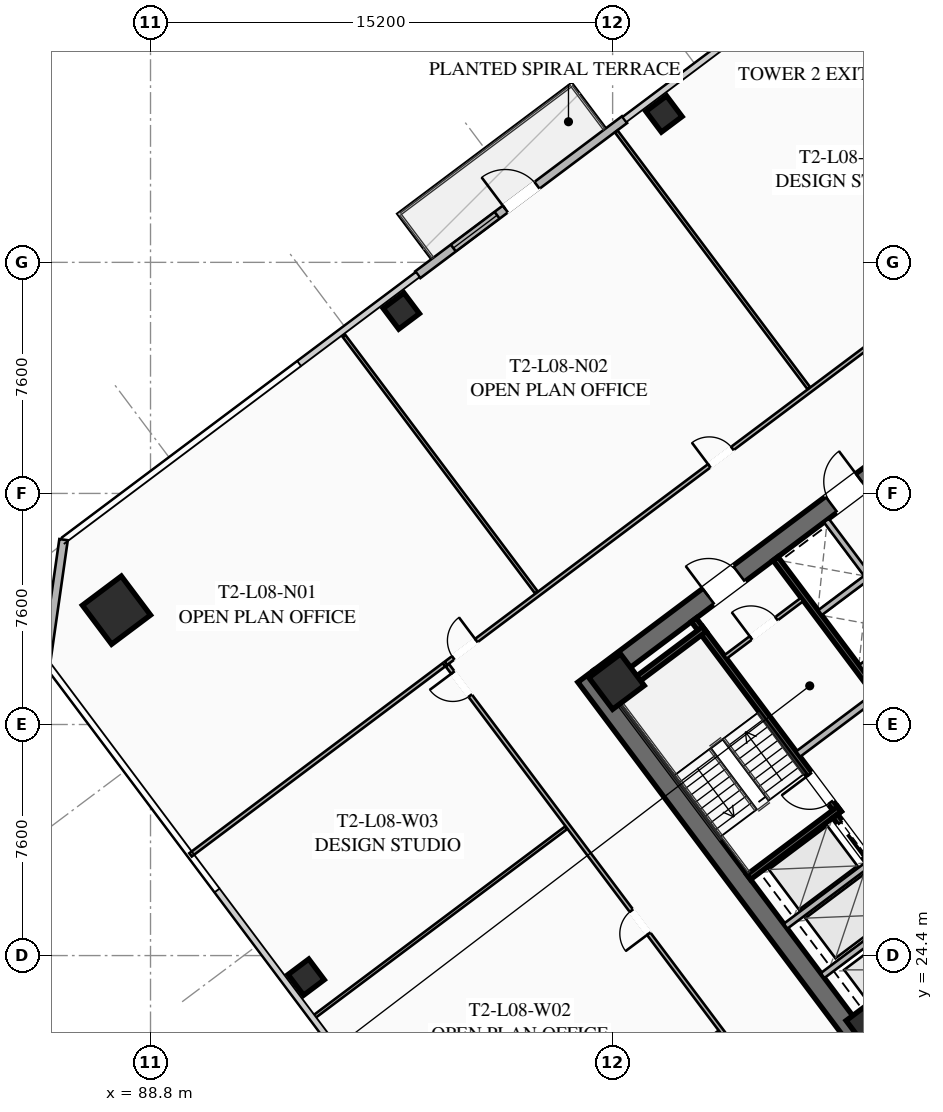
"""IFC4 building model, lengths in metres.
Left out: names, types, materials, properties, quantities, classifications, styles, units other than length and angle.
Written with IfcOpenShell. Run it as: python <this file> out.ifc"""

import sys

from ifc_helpers import new_model, si_unit, direction, frame, frame_2d, origin, origin_2d, place, context, subcontext, project, spatial, rectangle, hollow_rectangle, extrude, element, fill, save


model = new_model("IFC4")
c1 = context("Model", 3, precision=1e-05, world=origin(), true_north=direction((0.0, 1.0)))
c2 = subcontext(c1, "Body", "Model", "MODEL_VIEW")
j1 = project(units=[si_unit("LENGTHUNIT", "METRE"), si_unit("PLANEANGLEUNIT", "RADIAN")], contexts=[c1])
p1 = place(None, origin())
s1 = spatial("IfcSite", under=j1, at=p1, CompositionType="ELEMENT")
p2 = place(p1, origin())
s2 = spatial("IfcBuilding", under=s1, at=p2, CompositionType="ELEMENT")
p3 = place(p2, frame((0.0, 0.0, 35.25)))
s3 = spatial("IfcBuildingStorey", under=s2, at=p3, CompositionType="ELEMENT", Elevation=35.25)
p4 = place(p3, frame((112.476, 21.107, 0.0), z_axis=(0.0, 0.0, 1.0), x_axis=(-0.600005007985, 0.799996243986, 0.0)))
e1 = element("IfcWall", 1, at=p4, inside=s3, PredefinedType="SHEAR", context=c2, shape_type="SweptSolid", body=[
    extrude(rectangle(XDim=15.6, YDim=0.65, at=frame_2d((7.8, 0.0))), origin(), (0.0, 0.0, 1.0), 3.55),
])
p5 = place(p3, frame((103.571, 33.522, 0.0), z_axis=(0.0, 0.0, 1.0), x_axis=(0.799998028465, 0.600002628705, 0.0)))
e2 = element("IfcWall", 2, at=p5, inside=s3, PredefinedType="SHEAR", context=c2, shape_type="SweptSolid", body=[
    extrude(rectangle(XDim=14.86, YDim=0.65, at=frame_2d((7.43, 0.0))), origin(), (0.0, 0.0, 1.0), 3.55),
])
p6 = place(p5, frame((4.48, 0.0, 0.0)))
e3 = element("IfcOpeningElement", 3, at=p6, cuts=e2, PredefinedType="OPENING", context=c2, shape_type="SweptSolid", body=[
    extrude(rectangle(XDim=1.25, YDim=2.25, at=frame_2d((0.625, 1.125))), frame((0.0, 0.335, 0.0), z_axis=(0.0, -1.0, 0.0), x_axis=(1.0, 0.0, 0.0)), (0.0, 0.0, 1.0), 0.67),
])
p7 = place(p5, frame((9.53, 0.0, 0.0)))
e4 = element("IfcOpeningElement", 4, at=p7, cuts=e2, PredefinedType="OPENING", context=c2, shape_type="SweptSolid", body=[
    extrude(rectangle(XDim=1.25, YDim=2.25, at=frame_2d((0.625, 1.125))), frame((0.0, 0.335, 0.0), z_axis=(0.0, -1.0, 0.0), x_axis=(1.0, 0.0, 0.0)), (0.0, 0.0, 1.0), 0.67),
])
for number, where, z_axis, x_axis in (
    (5, (112.59, 22.13, 0.0), (0.0, 0.0, 1.0), (0.8, 0.6, 0.0)),
    (6, (104.13, 33.41, 0.0), (0.0, 0.0, 1.0), (0.8, 0.6, 0.0)),
):
    element("IfcColumn", number, at=place(p3, frame(where, z_axis=z_axis, x_axis=x_axis)), inside=s3, PredefinedType="COLUMN", context=c2, shape_type="SweptSolid", body=[
        extrude(hollow_rectangle(XDim=1.3, YDim=1.3, WallThickness=0.05, at=origin_2d()), origin(), (0.0, 0.0, 1.0), 3.35),
    ])
p8 = place(p3, frame((87.68, 35.76, 0.0), z_axis=(0.0, 0.0, 1.0), x_axis=(0.799999996291, 0.600000004945, 0.0)))
e7 = element("IfcColumn", 7, at=p8, inside=s3, PredefinedType="COLUMN", context=c2, shape_type="SweptSolid", body=[
    extrude(hollow_rectangle(XDim=1.6, YDim=1.6, WallThickness=0.06, at=origin_2d()), origin(), (0.0, 0.0, 1.0), 3.35),
])
for number, where, z_axis, x_axis in (
    (8, (105.69, 52.08, 0.0), (0.0, 0.0, 1.0), (0.8, 0.6, 0.0)),
    (9, (97.05, 45.6, 0.0), (0.0, 0.0, 1.0), (0.8, 0.6, 0.0)),
    (10, (93.92, 23.69, 0.0), (0.0, 0.0, 1.0), (0.8, 0.6, 0.0)),
):
    element("IfcColumn", number, at=place(p3, frame(where, z_axis=z_axis, x_axis=x_axis)), inside=s3, PredefinedType="COLUMN", context=c2, shape_type="SweptSolid", body=[
        extrude(hollow_rectangle(XDim=0.85, YDim=0.85, WallThickness=0.035, at=origin_2d()), origin(), (0.0, 0.0, 1.0), 3.35),
    ])
p9 = place(p3, frame((97.592, 46.794, 0.0), z_axis=(0.0, 0.0, 1.0), x_axis=(0.799996553335, 0.600004595526, 0.0)))
e11 = element("IfcWall", 11, at=p9, inside=s3, PredefinedType="SOLIDWALL", context=c2, shape_type="SweptSolid", body=[
    extrude(rectangle(XDim=8.5, YDim=0.28, at=frame_2d((4.25, 0.0))), origin(), (0.0, 0.0, 1.0), 3.35),
])
p10 = place(p9, frame((3.6, 0.0, 0.0)))
e12 = element("IfcOpeningElement", 12, at=p10, cuts=e11, PredefinedType="OPENING", context=c2, shape_type="SweptSolid", body=[
    extrude(rectangle(XDim=1.3, YDim=2.15, at=frame_2d((0.65, 1.075))), frame((0.0, 0.15, 0.0), z_axis=(0.0, -1.0, 0.0), x_axis=(1.0, 0.0, 0.0)), (0.0, 0.0, 1.0), 0.3),
])
p11 = place(p9, frame((1.46, 0.0, 0.85)))
e13 = element("IfcOpeningElement", 13, at=p11, cuts=e11, PredefinedType="OPENING", context=c2, shape_type="SweptSolid", body=[
    extrude(rectangle(XDim=1.8, YDim=1.92, at=frame_2d((0.9, 0.96))), frame((0.0, 0.15, 0.0), z_axis=(0.0, -1.0, 0.0), x_axis=(1.0, 0.0, 0.0)), (0.0, 0.0, 1.0), 0.3),
])
p12 = place(p3, frame((85.36, 34.02, 0.0), z_axis=(0.0, 0.0, 1.0), x_axis=(0.14137968631, 0.989955445613, 0.0)))
e14 = element("IfcWall", 14, at=p12, inside=s3, PredefinedType="SOLIDWALL", context=c2, shape_type="SweptSolid", body=[
    extrude(rectangle(XDim=4.101, YDim=0.28, at=frame_2d((2.051, 0.0))), origin(), (0.0, 0.0, 1.0), 3.35),
])
p13 = place(p3, frame((111.44, 29.08, 0.0), z_axis=(0.0, 0.0, 1.0), x_axis=(-0.600009827119, 0.799992629566, 0.0)))
e15 = element("IfcWall", 15, at=p13, inside=s3, PredefinedType="SHEAR", context=c2, shape_type="SweptSolid", body=[
    extrude(rectangle(XDim=7.95, YDim=0.2, at=frame_2d((3.975, 0.0))), origin(), (0.0, 0.0, 1.0), 3.35),
])
p14 = place(p13, frame((0.45, 0.0, 0.0)))
e16 = element("IfcOpeningElement", 16, at=p14, cuts=e15, PredefinedType="OPENING", context=c2, shape_type="SweptSolid", body=[
    extrude(rectangle(XDim=1.15, YDim=2.2, at=frame_2d((0.575, 1.1))), frame((0.0, 0.11, 0.0), z_axis=(0.0, -1.0, 0.0), x_axis=(1.0, 0.0, 0.0)), (0.0, 0.0, 1.0), 0.22),
])
for number, where, z_axis, x_axis in (
    (17, (108.476, 26.982, 0.0), (0.0, 0.0, 1.0), (0.8, 0.6, 0.0)),
    (18, (104.036, 32.902, 0.0), (0.0, 0.0, 1.0), (0.8, 0.6, 0.0)),
):
    element("IfcWall", number, at=place(p3, frame(where, z_axis=z_axis, x_axis=x_axis)), inside=s3, PredefinedType="SHEAR", context=c2, shape_type="SweptSolid", body=[
        extrude(rectangle(XDim=3.73, YDim=0.2, at=frame_2d((1.865, 0.0))), origin(), (0.0, 0.0, 1.0), 3.35),
    ])
p15 = place(p3, frame((117.938, 26.016, 0.0), z_axis=(0.0, 0.0, 1.0), x_axis=(-0.600005463273, 0.799995902516, 0.0)))
e19 = element("IfcWall", 19, at=p15, inside=s3, PredefinedType="SHEAR", context=c2, shape_type="SweptSolid", body=[
    extrude(rectangle(XDim=14.3, YDim=0.2, at=frame_2d((7.15, 0.0))), origin(), (0.0, 0.0, 1.0), 3.35),
])
p16 = place(p3, frame((110.104, 31.028, 0.0), z_axis=(0.0, 0.0, 1.0), x_axis=(0.800018601094, 0.59997519774, 0.0)))
e20 = element("IfcWall", 20, at=p16, inside=s3, PredefinedType="SOLIDWALL", context=c2, shape_type="SweptSolid", body=[
    extrude(rectangle(XDim=3.15, YDim=0.22, at=frame_2d((1.575, 0.0))), origin(), (0.0, 0.0, 1.0), 2.703),
])
p17 = place(p3, frame((115.13, 23.91, 0.0), z_axis=(0.0, 0.0, 1.0), x_axis=(-0.599975393228, 0.800018454488, 0.0)))
e21 = element("IfcWall", 21, at=p17, inside=s3, PredefinedType="SHEAR", context=c2, shape_type="SweptSolid", body=[
    extrude(rectangle(XDim=6.35, YDim=0.2, at=frame_2d((3.175, 0.0))), origin(), (0.0, 0.0, 1.0), 3.35),
])
p18 = place(p17, frame((4.775, 0.0, 0.0)))
e22 = element("IfcOpeningElement", 22, at=p18, cuts=e21, PredefinedType="OPENING", context=c2, shape_type="SweptSolid", body=[
    extrude(rectangle(XDim=1.3, YDim=2.25, at=frame_2d((0.65, 1.125))), frame((0.0, 0.11, 0.0), z_axis=(0.0, -1.0, 0.0), x_axis=(1.0, 0.0, 0.0)), (0.0, 0.0, 1.0), 0.22),
])
p19 = place(p17, frame((2.775, 0.0, 0.0)))
e23 = element("IfcOpeningElement", 23, at=p19, cuts=e21, PredefinedType="OPENING", context=c2, shape_type="SweptSolid", body=[
    extrude(rectangle(XDim=1.3, YDim=2.25, at=frame_2d((0.65, 1.125))), frame((0.0, 0.11, 0.0), z_axis=(0.0, -1.0, 0.0), x_axis=(1.0, 0.0, 0.0)), (0.0, 0.0, 1.0), 0.22),
])
p20 = place(p17, frame((0.575, 0.0, 0.0)))
e24 = element("IfcOpeningElement", 24, at=p20, cuts=e21, PredefinedType="OPENING", context=c2, shape_type="SweptSolid", body=[
    extrude(rectangle(XDim=1.3, YDim=2.25, at=frame_2d((0.65, 1.125))), frame((0.0, 0.11, 0.0), z_axis=(0.0, -1.0, 0.0), x_axis=(1.0, 0.0, 0.0)), (0.0, 0.0, 1.0), 0.22),
])
for number, where, z_axis, x_axis in (
    (25, (110.906, 23.742, 0.0), (0.0, 0.0, 1.0), (0.8, 0.6, 0.0)),
    (26, (109.688, 25.366, 0.0), (0.0, 0.0, 1.0), (0.8, 0.6, 0.0)),
):
    element("IfcWall", number, at=place(p3, frame(where, z_axis=z_axis, x_axis=x_axis)), inside=s3, PredefinedType="SOLIDWALL", context=c2, shape_type="SweptSolid", body=[
        extrude(rectangle(XDim=3.38, YDim=0.2, at=frame_2d((1.69, 0.0))), origin(), (0.0, 0.0, 1.0), 3.35),
    ])
p21 = place(p3, frame((107.71, 34.22, 0.0), z_axis=(0.0, 0.0, 1.0), x_axis=(0.799981399002, 0.60002480053, 0.0)))
e27 = element("IfcWall", 27, at=p21, inside=s3, PredefinedType="PARTITIONING", context=c2, shape_type="SweptSolid", body=[
    extrude(rectangle(XDim=3.15, YDim=0.135, at=frame_2d((1.575, 0.0))), origin(), (0.0, 0.0, 1.0), 2.703),
])
p22 = place(p21, frame((1.05, 0.0, 0.0)))
e28 = element("IfcOpeningElement", 28, at=p22, cuts=e27, PredefinedType="OPENING", context=c2, shape_type="SweptSolid", body=[
    extrude(rectangle(XDim=1.05, YDim=2.2, at=frame_2d((0.525, 1.1))), frame((0.0, 0.077, 0.0), z_axis=(0.0, -1.0, 0.0), x_axis=(1.0, 0.0, 0.0)), (0.0, 0.0, 1.0), 0.155),
])
p23 = place(p3, frame((115.11, 33.27, 0.0), z_axis=(0.0, 0.0, 1.0), x_axis=(-0.600011488909, 0.79999138319, 0.0)))
e29 = element("IfcWall", 29, at=p23, inside=s3, PredefinedType="SOLIDWALL", context=c2, shape_type="SweptSolid", body=[
    extrude(rectangle(XDim=6.8, YDim=0.2, at=frame_2d((3.4, 0.0))), origin(), (0.0, 0.0, 1.0), 3.35),
])
p24 = place(p3, frame((112.176, 33.882, 0.0), z_axis=(0.0, 0.0, 1.0), x_axis=(0.8, 0.6, 0.0)))
e30 = element("IfcWall", 30, at=p24, inside=s3, PredefinedType="SOLIDWALL", context=c2, shape_type="SweptSolid", body=[
    extrude(rectangle(XDim=1.88, YDim=0.2, at=frame_2d((0.94, 0.0))), origin(), (0.0, 0.0, 1.0), 3.35),
])
p25 = place(p3, frame((110.826, 35.682, 0.0), z_axis=(0.0, 0.0, 1.0), x_axis=(0.799984418148, 0.600020775241, 0.0)))
e31 = element("IfcWall", 31, at=p25, inside=s3, PredefinedType="SOLIDWALL", context=c2, shape_type="SweptSolid", body=[
    extrude(rectangle(XDim=1.88, YDim=0.2, at=frame_2d((0.94, 0.0))), origin(), (0.0, 0.0, 1.0), 3.35),
])
p26 = place(p3, frame((98.516, 34.012, 0.0), z_axis=(0.0, 0.0, 1.0), x_axis=(0.799998035726, 0.600002619023, 0.0)))
e32 = element("IfcWall", 32, at=p26, inside=s3, PredefinedType="PARTITIONING", context=c2, shape_type="SweptSolid", body=[
    extrude(rectangle(XDim=29.83, YDim=0.135, at=frame_2d((14.915, 0.0))), origin(), (0.0, 0.0, 1.0), 2.703),
])
p27 = place(p26, frame((0.3, 0.0, 0.0)))
e33 = element("IfcOpeningElement", 33, at=p27, cuts=e32, PredefinedType="OPENING", context=c2, shape_type="SweptSolid", body=[
    extrude(rectangle(XDim=0.95, YDim=2.05, at=frame_2d((0.475, 1.025))), frame((0.0, 0.077, 0.0), z_axis=(0.0, -1.0, 0.0), x_axis=(1.0, 0.0, 0.0)), (0.0, 0.0, 1.0), 0.155),
])
p28 = place(p26, frame((10.829, 0.0, 0.0)))
e34 = element("IfcOpeningElement", 34, at=p28, cuts=e32, PredefinedType="OPENING", context=c2, shape_type="SweptSolid", body=[
    extrude(rectangle(XDim=0.95, YDim=2.05, at=frame_2d((0.475, 1.025))), frame((0.0, 0.077, 0.0), z_axis=(0.0, -1.0, 0.0), x_axis=(1.0, 0.0, 0.0)), (0.0, 0.0, 1.0), 0.155),
])
p29 = place(p26, frame((28.58, 0.0, 0.0)))
e35 = element("IfcOpeningElement", 35, at=p29, cuts=e32, PredefinedType="OPENING", context=c2, shape_type="SweptSolid", body=[
    extrude(rectangle(XDim=0.95, YDim=2.05, at=frame_2d((0.475, 1.025))), frame((0.0, 0.077, 0.0), z_axis=(0.0, -1.0, 0.0), x_axis=(1.0, 0.0, 0.0)), (0.0, 0.0, 1.0), 0.155),
])
for number, where, z_axis, x_axis in (
    (36, (101.492, 36.344, 0.0), (0.0, 0.0, 1.0), (-0.6, 0.8, 0.0)),
    (37, (110.452, 43.064, 0.0), (0.0, 0.0, 1.0), (-0.6, 0.8, 0.0)),
):
    element("IfcWall", number, at=place(p3, frame(where, z_axis=z_axis, x_axis=x_axis)), inside=s3, PredefinedType="PARTITIONING", context=c2, shape_type="SweptSolid", body=[
        extrude(rectangle(XDim=10.55, YDim=0.11, at=frame_2d((5.275, 0.0))), origin(), (0.0, 0.0, 1.0), 2.703),
    ])
p30 = place(p3, frame((135.67, 34.19, 0.0), z_axis=(0.0, 0.0, 1.0), x_axis=(-0.800000982127, -0.599998690494, 0.0)))
e38 = element("IfcWall", 38, at=p30, inside=s3, PredefinedType="PARTITIONING", context=c2, shape_type="SweptSolid", body=[
    extrude(rectangle(XDim=29.83, YDim=0.135, at=frame_2d((14.915, 0.0))), origin(), (0.0, 0.0, 1.0), 2.703),
])
p31 = place(p30, frame((28.5, 0.0, 0.0)))
e39 = element("IfcOpeningElement", 39, at=p31, cuts=e38, PredefinedType="OPENING", context=c2, shape_type="SweptSolid", body=[
    extrude(rectangle(XDim=0.95, YDim=2.05, at=frame_2d((0.475, 1.025))), frame((0.0, 0.077, 0.0), z_axis=(0.0, -1.0, 0.0), x_axis=(1.0, 0.0, 0.0)), (0.0, 0.0, 1.0), 0.155),
])
p32 = place(p30, frame((18.075, 0.0, 0.0)))
e40 = element("IfcOpeningElement", 40, at=p32, cuts=e38, PredefinedType="OPENING", context=c2, shape_type="SweptSolid", body=[
    extrude(rectangle(XDim=0.95, YDim=2.05, at=frame_2d((0.475, 1.025))), frame((0.0, 0.077, 0.0), z_axis=(0.0, -1.0, 0.0), x_axis=(1.0, 0.0, 0.0)), (0.0, 0.0, 1.0), 0.155),
])
p33 = place(p30, frame((0.38, 0.0, 0.0)))
e41 = element("IfcOpeningElement", 41, at=p33, cuts=e38, PredefinedType="OPENING", context=c2, shape_type="SweptSolid", body=[
    extrude(rectangle(XDim=0.95, YDim=2.05, at=frame_2d((0.475, 1.025))), frame((0.0, 0.077, 0.0), z_axis=(0.0, -1.0, 0.0), x_axis=(1.0, 0.0, 0.0)), (0.0, 0.0, 1.0), 0.155),
])
p34 = place(p3, frame((111.758, 16.356, 0.0), z_axis=(0.0, 0.0, 1.0), x_axis=(-0.600001776367, 0.799998667722, 0.0)))
e42 = element("IfcWall", 42, at=p34, inside=s3, PredefinedType="PARTITIONING", context=c2, shape_type="SweptSolid", body=[
    extrude(rectangle(XDim=21.99, YDim=0.135, at=frame_2d((10.995, 0.0))), origin(), (0.0, 0.0, 1.0), 2.703),
])
p35 = place(p34, frame((0.3, 0.0, 0.0)))
e43 = element("IfcOpeningElement", 43, at=p35, cuts=e42, PredefinedType="OPENING", context=c2, shape_type="SweptSolid", body=[
    extrude(rectangle(XDim=0.95, YDim=2.05, at=frame_2d((0.475, 1.025))), frame((0.0, 0.077, 0.0), z_axis=(0.0, -1.0, 0.0), x_axis=(1.0, 0.0, 0.0)), (0.0, 0.0, 1.0), 0.155),
])
p36 = place(p34, frame((10.952, 0.0, 0.0)))
e44 = element("IfcOpeningElement", 44, at=p36, cuts=e42, PredefinedType="OPENING", context=c2, shape_type="SweptSolid", body=[
    extrude(rectangle(XDim=0.95, YDim=2.05, at=frame_2d((0.475, 1.025))), frame((0.0, 0.077, 0.0), z_axis=(0.0, -1.0, 0.0), x_axis=(1.0, 0.0, 0.0)), (0.0, 0.0, 1.0), 0.155),
])
p37 = place(p34, frame((20.74, 0.0, 0.0)))
e45 = element("IfcOpeningElement", 45, at=p37, cuts=e42, PredefinedType="OPENING", context=c2, shape_type="SweptSolid", body=[
    extrude(rectangle(XDim=0.95, YDim=2.05, at=frame_2d((0.475, 1.025))), frame((0.0, 0.077, 0.0), z_axis=(0.0, -1.0, 0.0), x_axis=(1.0, 0.0, 0.0)), (0.0, 0.0, 1.0), 0.155),
])
p38 = place(p3, frame((98.452, 33.964, 0.0), z_axis=(0.0, 0.0, 1.0), x_axis=(-0.799988753532, -0.600014994998, 0.0)))
e46 = element("IfcWall", 46, at=p38, inside=s3, PredefinedType="PARTITIONING", context=c2, shape_type="SweptSolid", body=[
    extrude(rectangle(XDim=10.42, YDim=0.135, at=frame_2d((5.21, 0.0))), origin(), (0.0, 0.0, 1.0), 2.703),
])
for number, where, z_axis, x_axis in (
    (47, (99.176, 15.632, 0.0), (0.0, 0.0, 1.0), (0.8, 0.6, 0.0)),
    (48, (94.136, 22.352, 0.0), (0.0, 0.0, 1.0), (0.8, 0.6, 0.0)),
):
    element("IfcWall", number, at=place(p3, frame(where, z_axis=z_axis, x_axis=x_axis)), inside=s3, PredefinedType="PARTITIONING", context=c2, shape_type="SweptSolid", body=[
        extrude(rectangle(XDim=10.42, YDim=0.11, at=frame_2d((5.21, 0.0))), origin(), (0.0, 0.0, 1.0), 2.703),
    ])
p39 = place(p10, origin())
e49 = element("IfcDoor", 49, at=p39, inside=s3, OperationType="SINGLE_SWING_LEFT", PredefinedType="DOOR", context=c2, shape_type="SweptSolid", body=[
    extrude(rectangle(XDim=1.3, YDim=2.15, at=frame_2d((0.65, 1.075))), frame((0.0, 0.025, 0.0), z_axis=(0.0, -1.0, 0.0), x_axis=(1.0, 0.0, 0.0)), (0.0, 0.0, 1.0), 0.05),
])
fill(e12, e49)
p40 = place(p11, origin())
e50 = element("IfcWindow", 50, at=p40, inside=s3, PartitioningType="SINGLE_PANEL", PredefinedType="WINDOW", context=c2, shape_type="SweptSolid", body=[
    extrude(rectangle(XDim=1.8, YDim=1.92, at=frame_2d((0.9, 0.96))), frame((0.0, 0.03, 0.0), z_axis=(0.0, -1.0, 0.0), x_axis=(1.0, 0.0, 0.0)), (0.0, 0.0, 1.0), 0.06),
])
fill(e13, e50)
p41 = place(p6, origin())
e51 = element("IfcDoor", 51, at=p41, inside=s3, OperationType="SINGLE_SWING_LEFT", PredefinedType="DOOR", context=c2, shape_type="SweptSolid", body=[
    extrude(rectangle(XDim=1.25, YDim=2.25, at=frame_2d((0.625, 1.125))), frame((0.0, 0.025, 0.0), z_axis=(0.0, -1.0, 0.0), x_axis=(1.0, 0.0, 0.0)), (0.0, 0.0, 1.0), 0.05),
])
fill(e3, e51)
p42 = place(p7, origin())
e52 = element("IfcDoor", 52, at=p42, inside=s3, OperationType="SINGLE_SWING_RIGHT", PredefinedType="DOOR", context=c2, shape_type="SweptSolid", body=[
    extrude(rectangle(XDim=1.25, YDim=2.25, at=frame_2d((0.625, 1.125))), frame((0.0, 0.025, 0.0), z_axis=(0.0, -1.0, 0.0), x_axis=(1.0, 0.0, 0.0)), (0.0, 0.0, 1.0), 0.05),
])
fill(e4, e52)
p43 = place(p14, origin())
e53 = element("IfcDoor", 53, at=p43, inside=s3, OperationType="SINGLE_SWING_RIGHT", PredefinedType="DOOR", context=c2, shape_type="SweptSolid", body=[
    extrude(rectangle(XDim=1.15, YDim=2.2, at=frame_2d((0.575, 1.1))), frame((0.0, 0.025, 0.0), z_axis=(0.0, -1.0, 0.0), x_axis=(1.0, 0.0, 0.0)), (0.0, 0.0, 1.0), 0.05),
])
fill(e16, e53)
p44 = place(p22, origin())
e54 = element("IfcDoor", 54, at=p44, inside=s3, OperationType="SINGLE_SWING_LEFT", PredefinedType="DOOR", context=c2, shape_type="SweptSolid", body=[
    extrude(rectangle(XDim=1.05, YDim=2.2, at=frame_2d((0.525, 1.1))), frame((0.0, 0.025, 0.0), z_axis=(0.0, -1.0, 0.0), x_axis=(1.0, 0.0, 0.0)), (0.0, 0.0, 1.0), 0.05),
])
fill(e28, e54)
p45 = place(p27, origin())
e55 = element("IfcDoor", 55, at=p45, inside=s3, OperationType="SINGLE_SWING_RIGHT", PredefinedType="DOOR", context=c2, shape_type="SweptSolid", body=[
    extrude(rectangle(XDim=0.95, YDim=2.05, at=frame_2d((0.475, 1.025))), frame((0.0, 0.025, 0.0), z_axis=(0.0, -1.0, 0.0), x_axis=(1.0, 0.0, 0.0)), (0.0, 0.0, 1.0), 0.05),
])
fill(e33, e55)
p46 = place(p28, origin())
e56 = element("IfcDoor", 56, at=p46, inside=s3, OperationType="SINGLE_SWING_LEFT", PredefinedType="DOOR", context=c2, shape_type="SweptSolid", body=[
    extrude(rectangle(XDim=0.95, YDim=2.05, at=frame_2d((0.475, 1.025))), frame((0.0, 0.025, 0.0), z_axis=(0.0, -1.0, 0.0), x_axis=(1.0, 0.0, 0.0)), (0.0, 0.0, 1.0), 0.05),
])
fill(e34, e56)
p47 = place(p36, origin())
e57 = element("IfcDoor", 57, at=p47, inside=s3, OperationType="SINGLE_SWING_LEFT", PredefinedType="DOOR", context=c2, shape_type="SweptSolid", body=[
    extrude(rectangle(XDim=0.95, YDim=2.05, at=frame_2d((0.475, 1.025))), frame((0.0, 0.025, 0.0), z_axis=(0.0, -1.0, 0.0), x_axis=(1.0, 0.0, 0.0)), (0.0, 0.0, 1.0), 0.05),
])
fill(e44, e57)
p48 = place(p37, origin())
e58 = element("IfcDoor", 58, at=p48, inside=s3, OperationType="SINGLE_SWING_RIGHT", PredefinedType="DOOR", context=c2, shape_type="SweptSolid", body=[
    extrude(rectangle(XDim=0.95, YDim=2.05, at=frame_2d((0.475, 1.025))), frame((0.0, 0.025, 0.0), z_axis=(0.0, -1.0, 0.0), x_axis=(1.0, 0.0, 0.0)), (0.0, 0.0, 1.0), 0.05),
])
fill(e45, e58)
p49 = place(p18, origin())
e59 = element("IfcDoor", 59, at=p49, inside=s3, OperationType="SLIDING_TO_LEFT", PredefinedType="DOOR", context=c2, shape_type="SweptSolid", body=[
    extrude(rectangle(XDim=1.3, YDim=2.25, at=frame_2d((0.65, 1.125))), frame((0.0, 0.025, 0.0), z_axis=(0.0, -1.0, 0.0), x_axis=(1.0, 0.0, 0.0)), (0.0, 0.0, 1.0), 0.05),
])
fill(e22, e59)
save(model, sys.argv[1])
